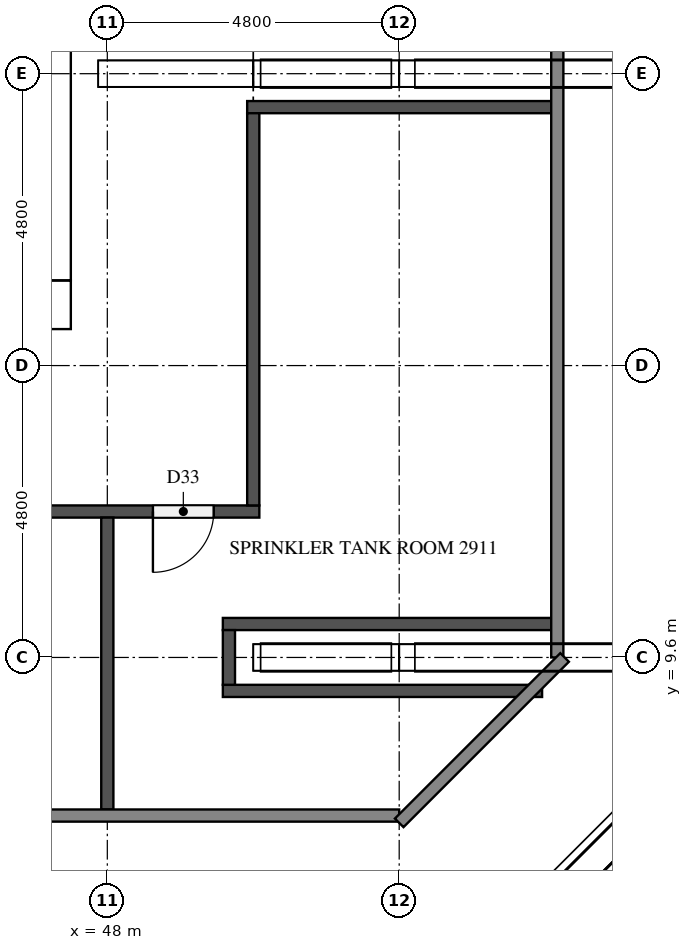
"""IFC4 building model, lengths in metres.
Left out: names, types, materials, properties, quantities, classifications, styles, units other than length and angle.
Written with IfcOpenShell. Run it as: python <this file> out.ifc"""

import sys

from ifc_helpers import new_model, si_unit, direction, frame, frame_2d, origin, place, context, subcontext, project, spatial, rectangle, extrude, element, fill, save


model = new_model("IFC4")
c1 = context("Model", 3, precision=1e-05, world=origin(), true_north=direction((0.0, 1.0)))
c2 = subcontext(c1, "Body", "Model", "MODEL_VIEW")
j1 = project(units=[si_unit("LENGTHUNIT", "METRE"), si_unit("PLANEANGLEUNIT", "RADIAN")], contexts=[c1])
p1 = place(None, origin())
s1 = spatial("IfcSite", under=j1, at=p1, CompositionType="ELEMENT")
p2 = place(p1, origin())
s2 = spatial("IfcBuilding", under=s1, at=p2, CompositionType="ELEMENT")
p3 = place(p2, frame((0.0, 0.0, 113.7)))
s3 = spatial("IfcBuildingStorey", under=s2, at=p3, CompositionType="ELEMENT", Elevation=113.7)
p4 = place(p3, frame((15.0, 15.4, 0.0), z_axis=(0.0, 0.0, 1.0), x_axis=(1.0, 0.0, 0.0)))
e1 = element("IfcWall", 1, at=p4, inside=s3, PredefinedType="SHEAR", context=c2, shape_type="SweptSolid", body=[
    extrude(rectangle(XDim=32.4, YDim=0.8, at=frame_2d((16.2, 0.0))), origin(), (0.0, 0.0, 1.0), 5.1),
])
p5 = place(p4, frame((15.3, 0.0, 0.0)))
e2 = element("IfcOpeningElement", 2, at=p5, cuts=e1, PredefinedType="OPENING", context=c2, shape_type="SweptSolid", body=[
    extrude(rectangle(XDim=1.8, YDim=2.1, at=frame_2d((0.9, 1.05))), frame((0.0, 0.41, 0.0), z_axis=(0.0, -1.0, 0.0), x_axis=(1.0, 0.0, 0.0)), (0.0, 0.0, 1.0), 0.82),
])
p6 = place(p3, frame((47.0, 15.8, 0.0), z_axis=(0.0, 0.0, 1.0), x_axis=(0.0, 1.0, 0.0)))
e3 = element("IfcWall", 3, at=p6, inside=s3, PredefinedType="SHEAR", context=c2, shape_type="SweptSolid", body=[
    extrude(rectangle(XDim=21.2, YDim=0.8, at=frame_2d((10.6, 0.0))), origin(), (0.0, 0.0, 1.0), 5.1),
])
p7 = place(p6, frame((10.3, 0.0, 0.0)))
e4 = element("IfcOpeningElement", 4, at=p7, cuts=e3, PredefinedType="OPENING", context=c2, shape_type="SweptSolid", body=[
    extrude(rectangle(XDim=1.2, YDim=2.1, at=frame_2d((0.6, 1.05))), frame((0.0, 0.41, 0.0), z_axis=(0.0, -1.0, 0.0), x_axis=(1.0, 0.0, 0.0)), (0.0, 0.0, 1.0), 0.82),
])
p8 = place(p3, frame((49.9, 9.05, 0.0), z_axis=(0.0, 0.0, 1.0), x_axis=(1.0, 0.0, 0.0)))
e5 = element("IfcWall", 5, at=p8, inside=s3, PredefinedType="PARTITIONING", context=c2, shape_type="SweptSolid", body=[
    extrude(rectangle(XDim=5.25, YDim=0.2, at=frame_2d((2.625, 0.0))), origin(), (0.0, 0.0, 1.0), 5.1),
])
p9 = place(p3, frame((49.9, 10.15, 0.0), z_axis=(0.0, 0.0, 1.0), x_axis=(1.0, 0.0, 0.0)))
e6 = element("IfcWall", 6, at=p9, inside=s3, PredefinedType="PARTITIONING", context=c2, shape_type="SweptSolid", body=[
    extrude(rectangle(XDim=5.4, YDim=0.2, at=frame_2d((2.7, 0.0))), origin(), (0.0, 0.0, 1.0), 5.1),
])
p10 = place(p3, frame((50.5, 12.0, 0.0), z_axis=(0.0, 0.0, 1.0), x_axis=(-1.0, 0.0, 0.0)))
e7 = element("IfcWall", 7, at=p10, inside=s3, PredefinedType="PARTITIONING", context=c2, shape_type="SweptSolid", body=[
    extrude(rectangle(XDim=7.3, YDim=0.2, at=frame_2d((3.65, 0.0))), origin(), (0.0, 0.0, 1.0), 5.1),
])
p11 = place(p10, frame((4.35, 0.0, 0.0)))
e8 = element("IfcOpeningElement", 8, at=p11, cuts=e7, PredefinedType="OPENING", context=c2, shape_type="SweptSolid", body=[
    extrude(rectangle(XDim=1.0, YDim=2.1, at=frame_2d((0.5, 1.05))), frame((0.0, 0.11, 0.0), z_axis=(0.0, -1.0, 0.0), x_axis=(1.0, 0.0, 0.0)), (0.0, 0.0, 1.0), 0.22),
])
p12 = place(p10, frame((0.75, 0.0, 0.0)))
e9 = element("IfcOpeningElement", 9, at=p12, cuts=e7, PredefinedType="OPENING", context=c2, shape_type="SweptSolid", body=[
    extrude(rectangle(XDim=1.0, YDim=2.1, at=frame_2d((0.5, 1.05))), frame((0.0, 0.11, 0.0), z_axis=(0.0, -1.0, 0.0), x_axis=(1.0, 0.0, 0.0)), (0.0, 0.0, 1.0), 0.22),
])
p13 = place(p3, frame((50.3, 18.65, 0.0), z_axis=(0.0, 0.0, 1.0), x_axis=(1.0, 0.0, 0.0)))
e10 = element("IfcWall", 10, at=p13, inside=s3, PredefinedType="PARTITIONING", context=c2, shape_type="SweptSolid", body=[
    extrude(rectangle(XDim=5.0, YDim=0.2, at=frame_2d((2.5, 0.0))), origin(), (0.0, 0.0, 1.0), 5.1),
])
p14 = place(p3, frame((48.0, 7.1, 0.0), z_axis=(0.0, 0.0, 1.0), x_axis=(0.0, 1.0, 0.0)))
e11 = element("IfcWall", 11, at=p14, inside=s3, PredefinedType="PARTITIONING", context=c2, shape_type="SweptSolid", body=[
    extrude(rectangle(XDim=4.8, YDim=0.2, at=frame_2d((2.4, 0.0))), origin(), (0.0, 0.0, 1.0), 5.1),
])
p15 = place(p3, frame((50.0, 9.15, 0.0), z_axis=(0.0, 0.0, 1.0), x_axis=(0.0, 1.0, 0.0)))
e12 = element("IfcWall", 12, at=p15, inside=s3, PredefinedType="PARTITIONING", context=c2, shape_type="SweptSolid", body=[
    extrude(rectangle(XDim=0.9, YDim=0.2, at=frame_2d((0.45, 0.0))), origin(), (0.0, 0.0, 1.0), 5.1),
])
p16 = place(p3, frame((50.4, 12.1, 0.0), z_axis=(0.0, 0.0, 1.0), x_axis=(0.0, 1.0, 0.0)))
e13 = element("IfcWall", 13, at=p16, inside=s3, PredefinedType="PARTITIONING", context=c2, shape_type="SweptSolid", body=[
    extrude(rectangle(XDim=6.45, YDim=0.2, at=frame_2d((3.225, 0.0))), origin(), (0.0, 0.0, 1.0), 5.1),
])
p17 = place(p12, origin())
e14 = element("IfcDoor", 14, at=p17, inside=s3, OperationType="SINGLE_SWING_RIGHT", PredefinedType="DOOR", context=c2, shape_type="SweptSolid", body=[
    extrude(rectangle(XDim=1.0, YDim=2.1, at=frame_2d((0.5, 1.05))), frame((0.0, 0.025, 0.0), z_axis=(0.0, -1.0, 0.0), x_axis=(1.0, 0.0, 0.0)), (0.0, 0.0, 1.0), 0.05),
])
fill(e9, e14)
save(model, sys.argv[1])
